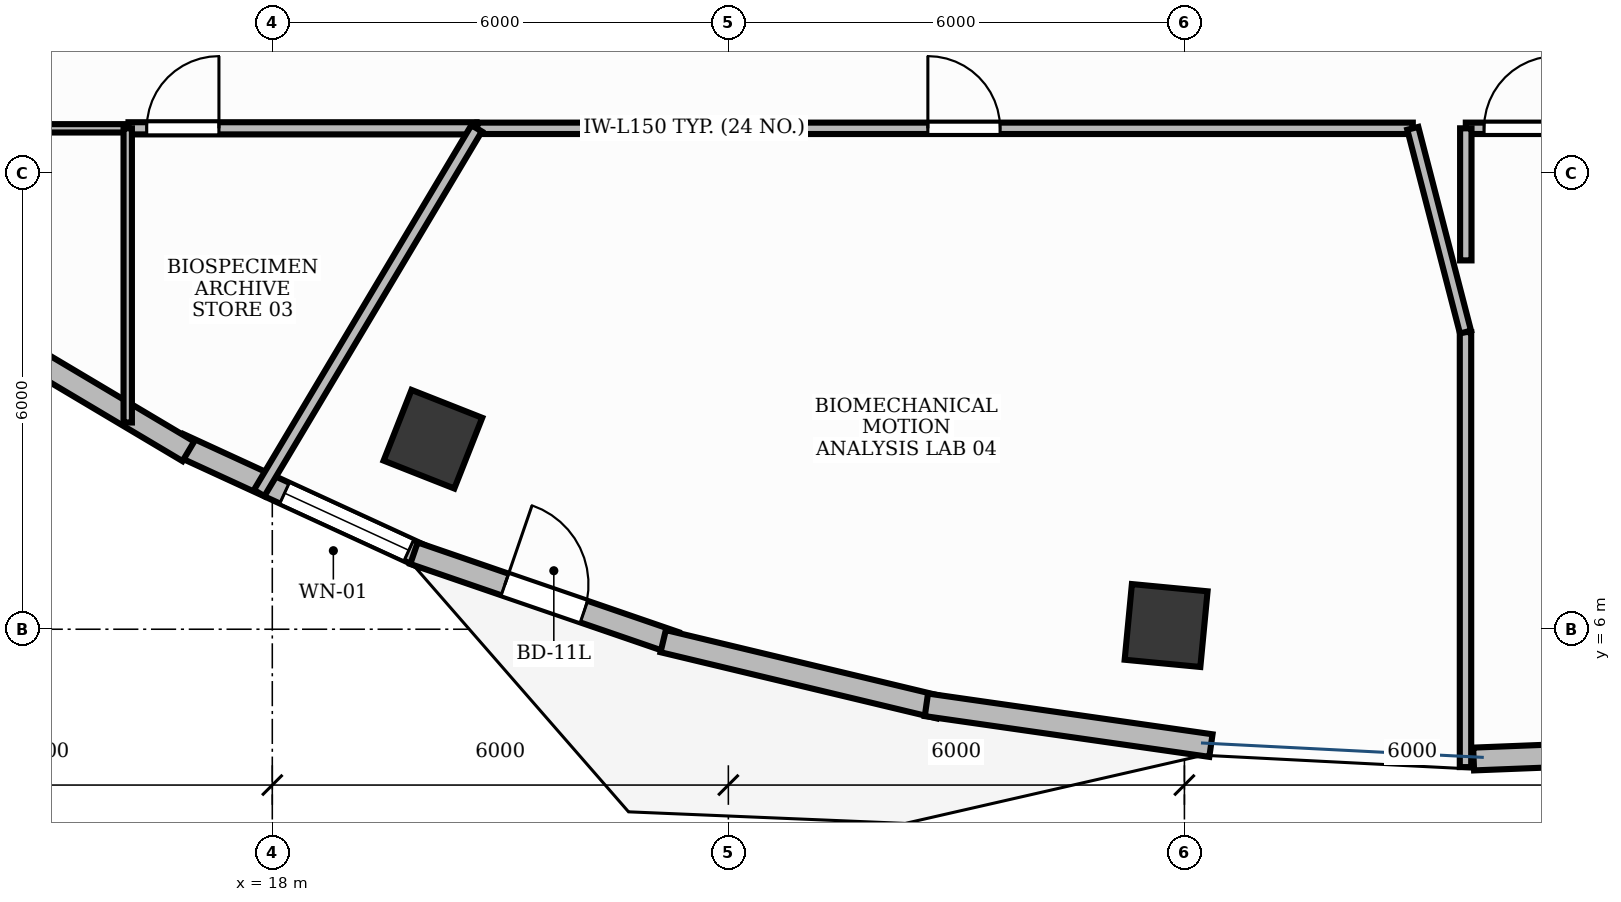
"""IFC4 building model, lengths in metres.
Left out: names, types, materials, properties, quantities, classifications, styles, units other than length and angle.
Written with IfcOpenShell. Run it as: python <this file> out.ifc"""

import sys

from ifc_helpers import new_model, si_unit, direction, frame, frame_2d, origin, origin_2d, place, context, subcontext, project, spatial, rectangle, extrude, element, fill, save


model = new_model("IFC4")
c1 = context("Model", 3, precision=1e-05, world=origin(), true_north=direction((0.0, 1.0)))
c2 = subcontext(c1, "Body", "Model", "MODEL_VIEW")
j1 = project(units=[si_unit("LENGTHUNIT", "METRE"), si_unit("PLANEANGLEUNIT", "RADIAN")], contexts=[c1])
p1 = place(None, origin())
s1 = spatial("IfcSite", under=j1, at=p1, CompositionType="ELEMENT")
p2 = place(p1, origin())
s2 = spatial("IfcBuilding", under=s1, at=p2, CompositionType="ELEMENT")
p3 = place(p2, frame((0.0, 0.0, 231.0)))
s3 = spatial("IfcBuildingStorey", under=s2, at=p3, CompositionType="ELEMENT", Elevation=231.0)
for number, where, z_axis, x_axis in (
    (1, (20.113, 8.5, -0.0), (0.0, 0.0, 1.0), (-0.93, 0.367, 0.0)),
    (2, (29.759, 6.049, -0.0), (0.0, 0.0, 1.0), (-0.995, 0.095, 0.0)),
):
    element("IfcColumn", number, at=place(p3, frame(where, z_axis=z_axis, x_axis=x_axis)), inside=s3, PredefinedType="COLUMN", context=c2, shape_type="SweptSolid", body=[
        extrude(rectangle(XDim=1.0, YDim=1.0, at=origin_2d()), origin(), (0.0, 0.0, 1.0), 3.901),
    ])
p4 = place(p3, frame((16.768, 8.432, 0.0), z_axis=(0.0, 0.0, 1.0), x_axis=(0.908478431596, -0.41793174003, 0.0)))
e3 = element("IfcWall", 3, at=p4, inside=s3, PredefinedType="STANDARD", context=c2, shape_type="SweptSolid", body=[
    extrude(rectangle(XDim=3.547, YDim=0.3, at=frame_2d((1.773, 0.0))), origin(), (0.0, 0.0, 1.0), 3.9),
])
p5 = place(p4, frame((1.534, 0.0, 0.9)))
e4 = element("IfcOpeningElement", 4, at=p5, cuts=e3, PredefinedType="OPENING", context=c2, shape_type="SweptSolid", body=[
    extrude(rectangle(XDim=1.8, YDim=2.1, at=frame_2d((0.9, 1.05))), frame((0.0, 0.165, 0.0), z_axis=(0.0, -1.0, 0.0), x_axis=(1.0, 0.0, 0.0)), (0.0, 0.0, 1.0), 0.33),
])
p6 = place(p3, frame((19.864, 7.0, 0.0), z_axis=(0.0, 0.0, 1.0), x_axis=(0.945702753898, -0.325032769531, 0.0)))
e5 = element("IfcWall", 5, at=p6, inside=s3, PredefinedType="STANDARD", context=c2, shape_type="SweptSolid", body=[
    extrude(rectangle(XDim=3.629, YDim=0.3, at=frame_2d((1.815, 0.0))), origin(), (0.0, 0.0, 1.0), 3.9),
])
p7 = place(p6, frame((1.265, 0.0, 0.0)))
e6 = element("IfcOpeningElement", 6, at=p7, cuts=e5, PredefinedType="OPENING", context=c2, shape_type="SweptSolid", body=[
    extrude(rectangle(XDim=1.1, YDim=2.15, at=frame_2d((0.55, 1.075))), frame((0.0, 0.165, 0.0), z_axis=(0.0, -1.0, 0.0), x_axis=(1.0, 0.0, 0.0)), (0.0, 0.0, 1.0), 0.33),
])
p8 = place(p3, frame((13.896, 10.125, 0.0), z_axis=(0.0, 0.0, 1.0), x_axis=(0.859467780744, -0.511189919563, 0.0)))
e7 = element("IfcWall", 7, at=p8, inside=s3, PredefinedType="STANDARD", context=c2, shape_type="SweptSolid", body=[
    extrude(rectangle(XDim=3.49, YDim=0.3, at=frame_2d((1.745, 0.0))), origin(), (0.0, 0.0, 1.0), 3.9),
])
p9 = place(p3, frame((23.143, 5.843, 0.0), z_axis=(0.0, 0.0, 1.0), x_axis=(0.972475629939, -0.233004611918, 0.0)))
e8 = element("IfcWall", 8, at=p9, inside=s3, PredefinedType="STANDARD", context=c2, shape_type="SweptSolid", body=[
    extrude(rectangle(XDim=3.735, YDim=0.3, at=frame_2d((1.868, 0.0))), origin(), (0.0, 0.0, 1.0), 3.9),
])
p10 = place(p3, frame((26.605, 5.005, 0.0), z_axis=(0.0, 0.0, 1.0), x_axis=(0.989897776303, -0.141782906128, 0.0)))
e9 = element("IfcWall", 9, at=p10, inside=s3, PredefinedType="STANDARD", context=c2, shape_type="SweptSolid", body=[
    extrude(rectangle(XDim=3.781, YDim=0.3, at=frame_2d((1.891, 0.0))), origin(), (0.0, 0.0, 1.0), 3.9),
])
p11 = place(p3, frame((33.805, 4.292, 0.0), z_axis=(0.0, 0.0, 1.0), x_axis=(0.999221923177, 0.039440439173, 0.0)))
e10 = element("IfcWall", 10, at=p11, inside=s3, PredefinedType="STANDARD", context=c2, shape_type="SweptSolid", body=[
    extrude(rectangle(XDim=3.807, YDim=0.3, at=frame_2d((1.903, 0.0))), origin(), (0.0, 0.0, 1.0), 3.9),
])
p12 = place(p3, frame((16.108, 12.59, 0.0), z_axis=(0.0, 0.0, 1.0), x_axis=(1.0, 0.0, 0.0)))
e11 = element("IfcWall", 11, at=p12, inside=s3, PredefinedType="PARTITIONING", context=c2, shape_type="SweptSolid", body=[
    extrude(rectangle(XDim=4.58, YDim=0.16, at=frame_2d((2.29, 0.0))), origin(), (0.0, 0.0, 1.0), 2.91),
])
p13 = place(p12, frame((0.24, 0.0, 0.0)))
e12 = element("IfcOpeningElement", 12, at=p13, cuts=e11, PredefinedType="OPENING", context=c2, shape_type="SweptSolid", body=[
    extrude(rectangle(XDim=0.95, YDim=2.15, at=frame_2d((0.475, 1.075))), frame((0.0, 0.095, 0.0), z_axis=(0.0, -1.0, 0.0), x_axis=(1.0, 0.0, 0.0)), (0.0, 0.0, 1.0), 0.19),
])
p14 = place(p3, frame((20.698, 12.59, 0.0), z_axis=(0.0, 0.0, 1.0), x_axis=(1.0, 0.0, 0.0)))
e13 = element("IfcWall", 13, at=p14, inside=s3, PredefinedType="PARTITIONING", context=c2, shape_type="SweptSolid", body=[
    extrude(rectangle(XDim=12.307, YDim=0.15, at=frame_2d((6.153, 0.0))), origin(), (0.0, 0.0, 1.0), 2.91),
])
p15 = place(p14, frame((5.927, 0.0, 0.0)))
e14 = element("IfcOpeningElement", 14, at=p15, cuts=e13, PredefinedType="OPENING", context=c2, shape_type="SweptSolid", body=[
    extrude(rectangle(XDim=0.95, YDim=2.15, at=frame_2d((0.475, 1.075))), frame((0.0, 0.09, 0.0), z_axis=(0.0, -1.0, 0.0), x_axis=(1.0, 0.0, 0.0)), (0.0, 0.0, 1.0), 0.18),
])
p16 = place(p3, frame((33.702, 12.59, 0.0), z_axis=(0.0, 0.0, 1.0), x_axis=(1.0, 0.0, 0.0)))
e15 = element("IfcWall", 15, at=p16, inside=s3, PredefinedType="PARTITIONING", context=c2, shape_type="SweptSolid", body=[
    extrude(rectangle(XDim=10.798, YDim=0.15, at=frame_2d((5.399, 0.0))), origin(), (0.0, 0.0, 1.0), 2.91),
])
p17 = place(p16, frame((0.24, 0.0, 0.0)))
e16 = element("IfcOpeningElement", 16, at=p17, cuts=e15, PredefinedType="OPENING", context=c2, shape_type="SweptSolid", body=[
    extrude(rectangle(XDim=0.95, YDim=2.15, at=frame_2d((0.475, 1.075))), frame((0.0, 0.09, 0.0), z_axis=(0.0, -1.0, 0.0), x_axis=(1.0, 0.0, 0.0)), (0.0, 0.0, 1.0), 0.18),
])
p18 = place(p3, frame((14.454, 12.59, 0.0), z_axis=(0.0, 0.0, 1.0), x_axis=(1.0, 0.0, 0.0)))
e17 = element("IfcWall", 17, at=p18, inside=s3, PredefinedType="MOVABLE", context=c2, shape_type="SweptSolid", body=[
    extrude(rectangle(XDim=1.644, YDim=0.11, at=frame_2d((0.822, 0.0))), origin(), (0.0, 0.0, 1.0), 2.91),
])
p19 = place(p3, frame((16.098, 12.59, 0.0), z_axis=(0.0, 0.0, 1.0), x_axis=(0.0, -1.0, 0.0)))
e18 = element("IfcWall", 18, at=p19, inside=s3, PredefinedType="MOVABLE", context=c2, shape_type="SweptSolid", body=[
    extrude(rectangle(XDim=3.87, YDim=0.11, at=frame_2d((1.935, 0.0))), origin(), (0.0, 0.0, 1.0), 2.91),
])
p20 = place(p3, frame((20.688, 12.59, 0.0), z_axis=(0.0, 0.0, 1.0), x_axis=(-0.512038498428, -0.858962499838, 0.0)))
e19 = element("IfcWall", 19, at=p20, inside=s3, PredefinedType="PARTITIONING", context=c2, shape_type="SweptSolid", body=[
    extrude(rectangle(XDim=5.586, YDim=0.16, at=frame_2d((2.793, 0.0))), origin(), (0.0, 0.0, 1.0), 2.91),
])
p21 = place(p3, frame((33.698, 9.909, 0.0), z_axis=(0.0, 0.0, 1.0), x_axis=(0.0, -1.0, 0.0)))
e20 = element("IfcWall", 20, at=p21, inside=s3, PredefinedType="PARTITIONING", context=c2, shape_type="SweptSolid", body=[
    extrude(rectangle(XDim=5.723, YDim=0.15, at=frame_2d((2.862, 0.0))), origin(), (0.0, 0.0, 1.0), 2.91),
])
p22 = place(p3, frame((33.005, 12.59, 0.0), z_axis=(0.0, 0.0, 1.0), x_axis=(0.250389945948, -0.968145069175, 0.0)))
e21 = element("IfcWall", 21, at=p22, inside=s3, PredefinedType="PARTITIONING", context=c2, shape_type="SweptSolid", body=[
    extrude(rectangle(XDim=2.769, YDim=0.15, at=frame_2d((1.385, 0.0))), origin(), (0.0, 0.0, 1.0), 2.91),
])
p23 = place(p3, frame((33.702, 10.852, 0.0), z_axis=(0.0, 0.0, 1.0), x_axis=(0.0, 1.0, 0.0)))
e22 = element("IfcWall", 22, at=p23, inside=s3, PredefinedType="PARTITIONING", context=c2, shape_type="SweptSolid", body=[
    extrude(rectangle(XDim=1.738, YDim=0.15, at=frame_2d((0.869, 0.0))), origin(), (0.0, 0.0, 1.0), 2.91),
])
p24 = place(p5, origin())
e23 = element("IfcWindow", 23, at=p24, inside=s3, PartitioningType="SINGLE_PANEL", PredefinedType="WINDOW", context=c2, shape_type="SweptSolid", body=[
    extrude(rectangle(XDim=1.8, YDim=2.1, at=frame_2d((0.9, 1.05))), frame((0.0, 0.03, 0.0), z_axis=(0.0, -1.0, 0.0), x_axis=(1.0, 0.0, 0.0)), (0.0, 0.0, 1.0), 0.06),
])
fill(e4, e23)
p25 = place(p7, origin())
e24 = element("IfcDoor", 24, at=p25, inside=s3, OperationType="SINGLE_SWING_LEFT", PredefinedType="DOOR", context=c2, shape_type="SweptSolid", body=[
    extrude(rectangle(XDim=1.1, YDim=2.15, at=frame_2d((0.55, 1.075))), frame((0.0, 0.025, 0.0), z_axis=(0.0, -1.0, 0.0), x_axis=(1.0, 0.0, 0.0)), (0.0, 0.0, 1.0), 0.05),
])
fill(e6, e24)
p26 = place(p13, origin())
e25 = element("IfcDoor", 25, at=p26, inside=s3, OperationType="SINGLE_SWING_RIGHT", PredefinedType="DOOR", context=c2, shape_type="SweptSolid", body=[
    extrude(rectangle(XDim=0.95, YDim=2.15, at=frame_2d((0.475, 1.075))), frame((0.0, 0.025, 0.0), z_axis=(0.0, -1.0, 0.0), x_axis=(1.0, 0.0, 0.0)), (0.0, 0.0, 1.0), 0.05),
])
fill(e12, e25)
p27 = place(p15, origin())
e26 = element("IfcDoor", 26, at=p27, inside=s3, OperationType="SINGLE_SWING_LEFT", PredefinedType="DOOR", context=c2, shape_type="SweptSolid", body=[
    extrude(rectangle(XDim=0.95, YDim=2.15, at=frame_2d((0.475, 1.075))), frame((0.0, 0.025, 0.0), z_axis=(0.0, -1.0, 0.0), x_axis=(1.0, 0.0, 0.0)), (0.0, 0.0, 1.0), 0.05),
])
fill(e14, e26)
p28 = place(p17, origin())
e27 = element("IfcDoor", 27, at=p28, inside=s3, OperationType="SINGLE_SWING_RIGHT", PredefinedType="DOOR", context=c2, shape_type="SweptSolid", body=[
    extrude(rectangle(XDim=0.95, YDim=2.15, at=frame_2d((0.475, 1.075))), frame((0.0, 0.025, 0.0), z_axis=(0.0, -1.0, 0.0), x_axis=(1.0, 0.0, 0.0)), (0.0, 0.0, 1.0), 0.05),
])
fill(e16, e27)
save(model, sys.argv[1])
